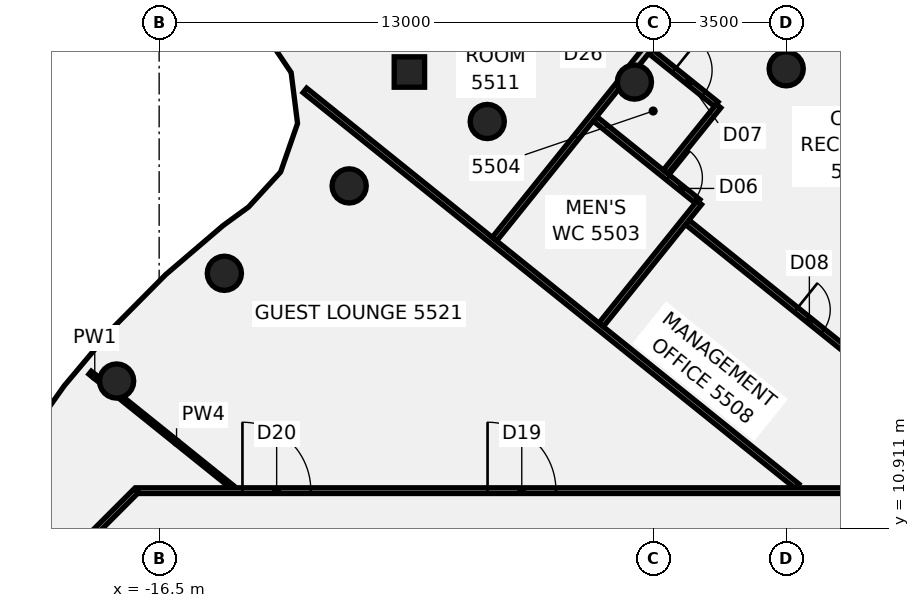
"""IFC4 building model, lengths in metres.
Left out: names, types, materials, properties, quantities, classifications, styles, units other than length and angle.
Written with IfcOpenShell. Run it as: python <this file> out.ifc"""

import sys

from ifc_helpers import new_model, si_unit, direction, frame, frame_2d, origin, origin_2d, place, context, subcontext, project, spatial, rectangle, circle, extrude, element, fill, save


model = new_model("IFC4")
c1 = context("Model", 3, precision=1e-05, world=origin(), true_north=direction((0.0, 1.0)))
c2 = subcontext(c1, "Body", "Model", "MODEL_VIEW")
j1 = project(units=[si_unit("LENGTHUNIT", "METRE"), si_unit("PLANEANGLEUNIT", "RADIAN")], contexts=[c1])
p1 = place(None, origin())
s1 = spatial("IfcSite", under=j1, at=p1, CompositionType="ELEMENT")
p2 = place(p1, origin())
s2 = spatial("IfcBuilding", under=s1, at=p2, CompositionType="ELEMENT")
p3 = place(p2, frame((0.0, 0.0, 219.9)))
s3 = spatial("IfcBuildingStorey", under=s2, at=p3, CompositionType="ELEMENT", Elevation=219.9)
for number, where, z_axis, x_axis in (
    (1, (0.0, 23.0, -0.14), (0.0, 0.0, 1.0), (1.0, 0.0, 0.0)),
    (2, (-3.994, 22.651, -0.14), (0.0, 0.0, 1.0), (1.0, 0.0, 0.0)),
    (3, (-7.866, 21.613, -0.14), (0.0, 0.0, 1.0), (1.0, 0.0, 0.0)),
    (4, (-11.5, 19.919, -0.14), (0.0, 0.0, 1.0), (1.0, 0.0, 0.0)),
    (5, (-14.784, 17.619, -0.14), (0.0, 0.0, 1.0), (1.0, 0.0, 0.0)),
    (6, (-17.619, 14.784, -0.14), (0.0, 0.0, 1.0), (1.0, 0.0, 0.0)),
):
    element("IfcColumn", number, at=place(p3, frame(where, z_axis=z_axis, x_axis=x_axis)), inside=s3, PredefinedType="COLUMN", context=c2, shape_type="SweptSolid", body=[
        extrude(circle(Radius=0.45, at=origin_2d()), origin(), (0.0, 0.0, 1.0), 3.6),
    ])
p4 = place(p3, frame((-9.915, 22.915, -0.134), z_axis=(-0.004139601239, -0.050218113387, 0.998729695558), x_axis=(0.626044507658, 0.7786689847, 0.04174789452)))
e7 = element("IfcColumn", 7, at=p4, inside=s3, PredefinedType="COLUMN", context=c2, shape_type="SweptSolid", body=[
    extrude(rectangle(XDim=0.8, YDim=0.8, at=origin_2d()), origin(), (0.0, 0.0, 1.0), 3.598),
])
p5 = place(p3, frame((-18.316, 15.002, 0.0), z_axis=(0.0, 0.0, 1.0), x_axis=(0.779570290479, -0.626314746914, 0.0)))
e8 = element("IfcWall", 8, at=p5, inside=s3, PredefinedType="PARTITIONING", context=c2, shape_type="SweptSolid", body=[
    extrude(rectangle(XDim=0.312, YDim=0.1, at=frame_2d((0.156, 0.0))), origin(), (0.0, 0.0, 1.0), 2.864),
])
p6 = place(p3, frame((-17.509, 14.354, 0.0), z_axis=(0.0, 0.0, 1.0), x_axis=(0.779411679893, -0.626512117398, 0.0)))
e9 = element("IfcWall", 9, at=p6, inside=s3, PredefinedType="PARTITIONING", context=c2, shape_type="SweptSolid", body=[
    extrude(rectangle(XDim=3.765, YDim=0.1, at=frame_2d((1.883, 0.0))), origin(), (0.0, 0.0, 1.0), 2.864),
])
p7 = place(p3, frame((-12.665, 22.432, 0.0), z_axis=(0.0, 0.0, 1.0), x_axis=(0.779284245227, -0.626670619338, 0.0)))
e10 = element("IfcWall", 10, at=p7, inside=s3, PredefinedType="PARTITIONING", context=c2, shape_type="SweptSolid", body=[
    extrude(rectangle(XDim=16.621, YDim=0.15, at=frame_2d((8.311, 0.0))), origin(), (0.0, 0.0, 1.0), 2.864),
])
p8 = place(p3, frame((-5.03, 21.682, 0.0), z_axis=(0.0, 0.0, 1.0), x_axis=(0.779278251962, -0.626678072074, 0.0)))
e11 = element("IfcWall", 11, at=p8, inside=s3, PredefinedType="PARTITIONING", context=c2, shape_type="SweptSolid", body=[
    extrude(rectangle(XDim=3.48, YDim=0.15, at=frame_2d((1.74, 0.0))), origin(), (0.0, 0.0, 1.0), 2.864),
])
p9 = place(p8, frame((2.47, 0.0, 0.0)))
e12 = element("IfcOpeningElement", 12, at=p9, cuts=e11, PredefinedType="OPENING", context=c2, shape_type="SweptSolid", body=[
    extrude(rectangle(XDim=0.9, YDim=2.1, at=frame_2d((0.45, 1.05))), frame((0.0, 0.085, 0.0), z_axis=(0.0, -1.0, 0.0), x_axis=(1.0, 0.0, 0.0)), (0.0, 0.0, 1.0), 0.17),
])
p10 = place(p3, frame((-3.558, 23.449, 0.0), z_axis=(0.0, 0.0, 1.0), x_axis=(0.779441374228, -0.626475174401, 0.0)))
e13 = element("IfcWall", 13, at=p10, inside=s3, PredefinedType="PARTITIONING", context=c2, shape_type="SweptSolid", body=[
    extrude(rectangle(XDim=2.206, YDim=0.15, at=frame_2d((1.103, 0.0))), origin(), (0.0, 0.0, 1.0), 2.864),
])
p11 = place(p10, frame((0.78, 0.0, 0.0)))
e14 = element("IfcOpeningElement", 14, at=p11, cuts=e13, PredefinedType="OPENING", context=c2, shape_type="SweptSolid", body=[
    extrude(rectangle(XDim=1.0, YDim=2.1, at=frame_2d((0.5, 1.05))), frame((0.0, 0.085, 0.0), z_axis=(0.0, -1.0, 0.0), x_axis=(1.0, 0.0, 0.0)), (0.0, 0.0, 1.0), 0.17),
])
p12 = place(p3, frame((-2.601, 18.959, 0.0), z_axis=(0.0, 0.0, 1.0), x_axis=(0.779260240467, -0.626700468826, 0.0)))
e15 = element("IfcWall", 15, at=p12, inside=s3, PredefinedType="PARTITIONING", context=c2, shape_type="SweptSolid", body=[
    extrude(rectangle(XDim=11.079, YDim=0.15, at=frame_2d((5.54, 0.0))), origin(), (0.0, 0.0, 1.0), 2.864),
])
p13 = place(p12, frame((3.67, 0.0, 0.0)))
e16 = element("IfcOpeningElement", 16, at=p13, cuts=e15, PredefinedType="OPENING", context=c2, shape_type="SweptSolid", body=[
    extrude(rectangle(XDim=0.9, YDim=2.1, at=frame_2d((0.45, 1.05))), frame((0.0, 0.085, 0.0), z_axis=(0.0, -1.0, 0.0), x_axis=(1.0, 0.0, 0.0)), (0.0, 0.0, 1.0), 0.17),
])
p14 = place(p3, frame((-17.065, 11.9, 0.0), z_axis=(0.0, 0.0, 1.0), x_axis=(1.0, 0.0, 0.0)))
e17 = element("IfcWall", 17, at=p14, inside=s3, PredefinedType="PARTITIONING", context=c2, shape_type="SweptSolid", body=[
    extrude(rectangle(XDim=34.165, YDim=0.15, at=frame_2d((17.083, 0.0))), origin(), (0.0, 0.0, 1.0), 2.864),
])
p15 = place(p14, frame((24.142, 0.0, 0.0)))
e18 = element("IfcOpeningElement", 18, at=p15, cuts=e17, PredefinedType="OPENING", context=c2, shape_type="SweptSolid", body=[
    extrude(rectangle(XDim=1.8, YDim=2.1, at=frame_2d((0.9, 1.05))), frame((0.0, 0.085, 0.0), z_axis=(0.0, -1.0, 0.0), x_axis=(1.0, 0.0, 0.0)), (0.0, 0.0, 1.0), 0.17),
])
p16 = place(p14, frame((9.207, 0.0, 0.0)))
e19 = element("IfcOpeningElement", 19, at=p16, cuts=e17, PredefinedType="OPENING", context=c2, shape_type="SweptSolid", body=[
    extrude(rectangle(XDim=1.8, YDim=2.1, at=frame_2d((0.9, 1.05))), frame((0.0, 0.085, 0.0), z_axis=(0.0, -1.0, 0.0), x_axis=(1.0, 0.0, 0.0)), (0.0, 0.0, 1.0), 0.17),
])
p17 = place(p14, frame((2.757, 0.0, 0.0)))
e20 = element("IfcOpeningElement", 20, at=p17, cuts=e17, PredefinedType="OPENING", context=c2, shape_type="SweptSolid", body=[
    extrude(rectangle(XDim=1.8, YDim=2.1, at=frame_2d((0.9, 1.05))), frame((0.0, 0.085, 0.0), z_axis=(0.0, -1.0, 0.0), x_axis=(1.0, 0.0, 0.0)), (0.0, 0.0, 1.0), 0.17),
])
p18 = place(p3, frame((-18.872, 10.128, 0.0), z_axis=(0.0, 0.0, 1.0), x_axis=(0.707106781187, 0.707106781187, 0.0)))
e21 = element("IfcWall", 21, at=p18, inside=s3, PredefinedType="PARTITIONING", context=c2, shape_type="SweptSolid", body=[
    extrude(rectangle(XDim=2.505, YDim=0.15, at=frame_2d((1.253, 0.0))), origin(), (0.0, 0.0, 1.0), 2.864),
])
p19 = place(p3, frame((-7.674, 18.521, 0.0), z_axis=(0.0, 0.0, 1.0), x_axis=(0.626662098772, 0.779291097064, 0.0)))
e22 = element("IfcWall", 22, at=p19, inside=s3, PredefinedType="PARTITIONING", context=c2, shape_type="SweptSolid", body=[
    extrude(rectangle(XDim=5.307, YDim=0.15, at=frame_2d((2.654, 0.0))), origin(), (0.0, 0.0, 1.0), 2.864),
])
p20 = place(p3, frame((-4.066, 23.008, 0.0), z_axis=(0.0, 0.0, 1.0), x_axis=(0.62666000118, 0.779292783824, 0.0)))
e23 = element("IfcWall", 23, at=p20, inside=s3, PredefinedType="PARTITIONING", context=c2, shape_type="SweptSolid", body=[
    extrude(rectangle(XDim=8.461, YDim=0.2, at=frame_2d((4.231, 0.0))), origin(), (0.0, 0.0, 1.0), 2.864),
])
p21 = place(p20, frame((0.962, 0.0, 0.0)))
e24 = element("IfcOpeningElement", 24, at=p21, cuts=e23, PredefinedType="OPENING", context=c2, shape_type="SweptSolid", body=[
    extrude(rectangle(XDim=1.4, YDim=2.1, at=frame_2d((0.7, 1.05))), frame((0.0, 0.11, 0.0), z_axis=(0.0, -1.0, 0.0), x_axis=(1.0, 0.0, 0.0)), (0.0, 0.0, 1.0), 0.22),
])
p22 = place(p3, frame((-4.869, 16.265, 0.0), z_axis=(0.0, 0.0, 1.0), x_axis=(0.626586553854, 0.779351840012, 0.0)))
e25 = element("IfcWall", 25, at=p22, inside=s3, PredefinedType="PARTITIONING", context=c2, shape_type="SweptSolid", body=[
    extrude(rectangle(XDim=4.12, YDim=0.15, at=frame_2d((2.06, 0.0))), origin(), (0.0, 0.0, 1.0), 2.864),
])
p23 = place(p3, frame((-3.172, 20.29, 0.0), z_axis=(0.0, 0.0, 1.0), x_axis=(0.626905231465, 0.779095520949, 0.0)))
e26 = element("IfcWall", 26, at=p23, inside=s3, PredefinedType="PARTITIONING", context=c2, shape_type="SweptSolid", body=[
    extrude(rectangle(XDim=2.22, YDim=0.15, at=frame_2d((1.11, 0.0))), origin(), (0.0, 0.0, 1.0), 2.864),
])
p24 = place(p9, frame((0.9, 0.0, 0.0), z_axis=(0.0, 0.0, 1.0), x_axis=(-1.0, 0.0, 0.0)))
e27 = element("IfcDoor", 27, at=p24, inside=s3, OperationType="SINGLE_SWING_RIGHT", PredefinedType="DOOR", context=c2, shape_type="SweptSolid", body=[
    extrude(rectangle(XDim=0.9, YDim=2.1, at=frame_2d((0.45, 1.05))), frame((0.0, 0.025, 0.0), z_axis=(0.0, -1.0, 0.0), x_axis=(1.0, 0.0, 0.0)), (0.0, 0.0, 1.0), 0.05),
])
fill(e12, e27)
p25 = place(p11, frame((1.0, 0.0, 0.0), z_axis=(0.0, 0.0, 1.0), x_axis=(-1.0, 0.0, 0.0)))
e28 = element("IfcDoor", 28, at=p25, inside=s3, OperationType="SINGLE_SWING_RIGHT", PredefinedType="DOOR", context=c2, shape_type="SweptSolid", body=[
    extrude(rectangle(XDim=1.0, YDim=2.1, at=frame_2d((0.5, 1.05))), frame((0.0, 0.025, 0.0), z_axis=(0.0, -1.0, 0.0), x_axis=(1.0, 0.0, 0.0)), (0.0, 0.0, 1.0), 0.05),
])
fill(e14, e28)
p26 = place(p13, frame((0.9, 0.0, 0.0), z_axis=(0.0, 0.0, 1.0), x_axis=(-1.0, 0.0, 0.0)))
e29 = element("IfcDoor", 29, at=p26, inside=s3, OperationType="SINGLE_SWING_LEFT", PredefinedType="DOOR", context=c2, shape_type="SweptSolid", body=[
    extrude(rectangle(XDim=0.9, YDim=2.1, at=frame_2d((0.45, 1.05))), frame((0.0, 0.025, 0.0), z_axis=(0.0, -1.0, 0.0), x_axis=(1.0, 0.0, 0.0)), (0.0, 0.0, 1.0), 0.05),
])
fill(e16, e29)
p27 = place(p16, origin())
e30 = element("IfcDoor", 30, at=p27, inside=s3, OperationType="DOUBLE_DOOR_SINGLE_SWING", PredefinedType="DOOR", context=c2, shape_type="SweptSolid", body=[
    extrude(rectangle(XDim=1.8, YDim=2.1, at=frame_2d((0.9, 1.05))), frame((0.0, 0.025, 0.0), z_axis=(0.0, -1.0, 0.0), x_axis=(1.0, 0.0, 0.0)), (0.0, 0.0, 1.0), 0.05),
])
fill(e19, e30)
p28 = place(p17, origin())
e31 = element("IfcDoor", 31, at=p28, inside=s3, OperationType="DOUBLE_DOOR_SINGLE_SWING", PredefinedType="DOOR", context=c2, shape_type="SweptSolid", body=[
    extrude(rectangle(XDim=1.8, YDim=2.1, at=frame_2d((0.9, 1.05))), frame((0.0, 0.025, 0.0), z_axis=(0.0, -1.0, 0.0), x_axis=(1.0, 0.0, 0.0)), (0.0, 0.0, 1.0), 0.05),
])
fill(e20, e31)
save(model, sys.argv[1])
